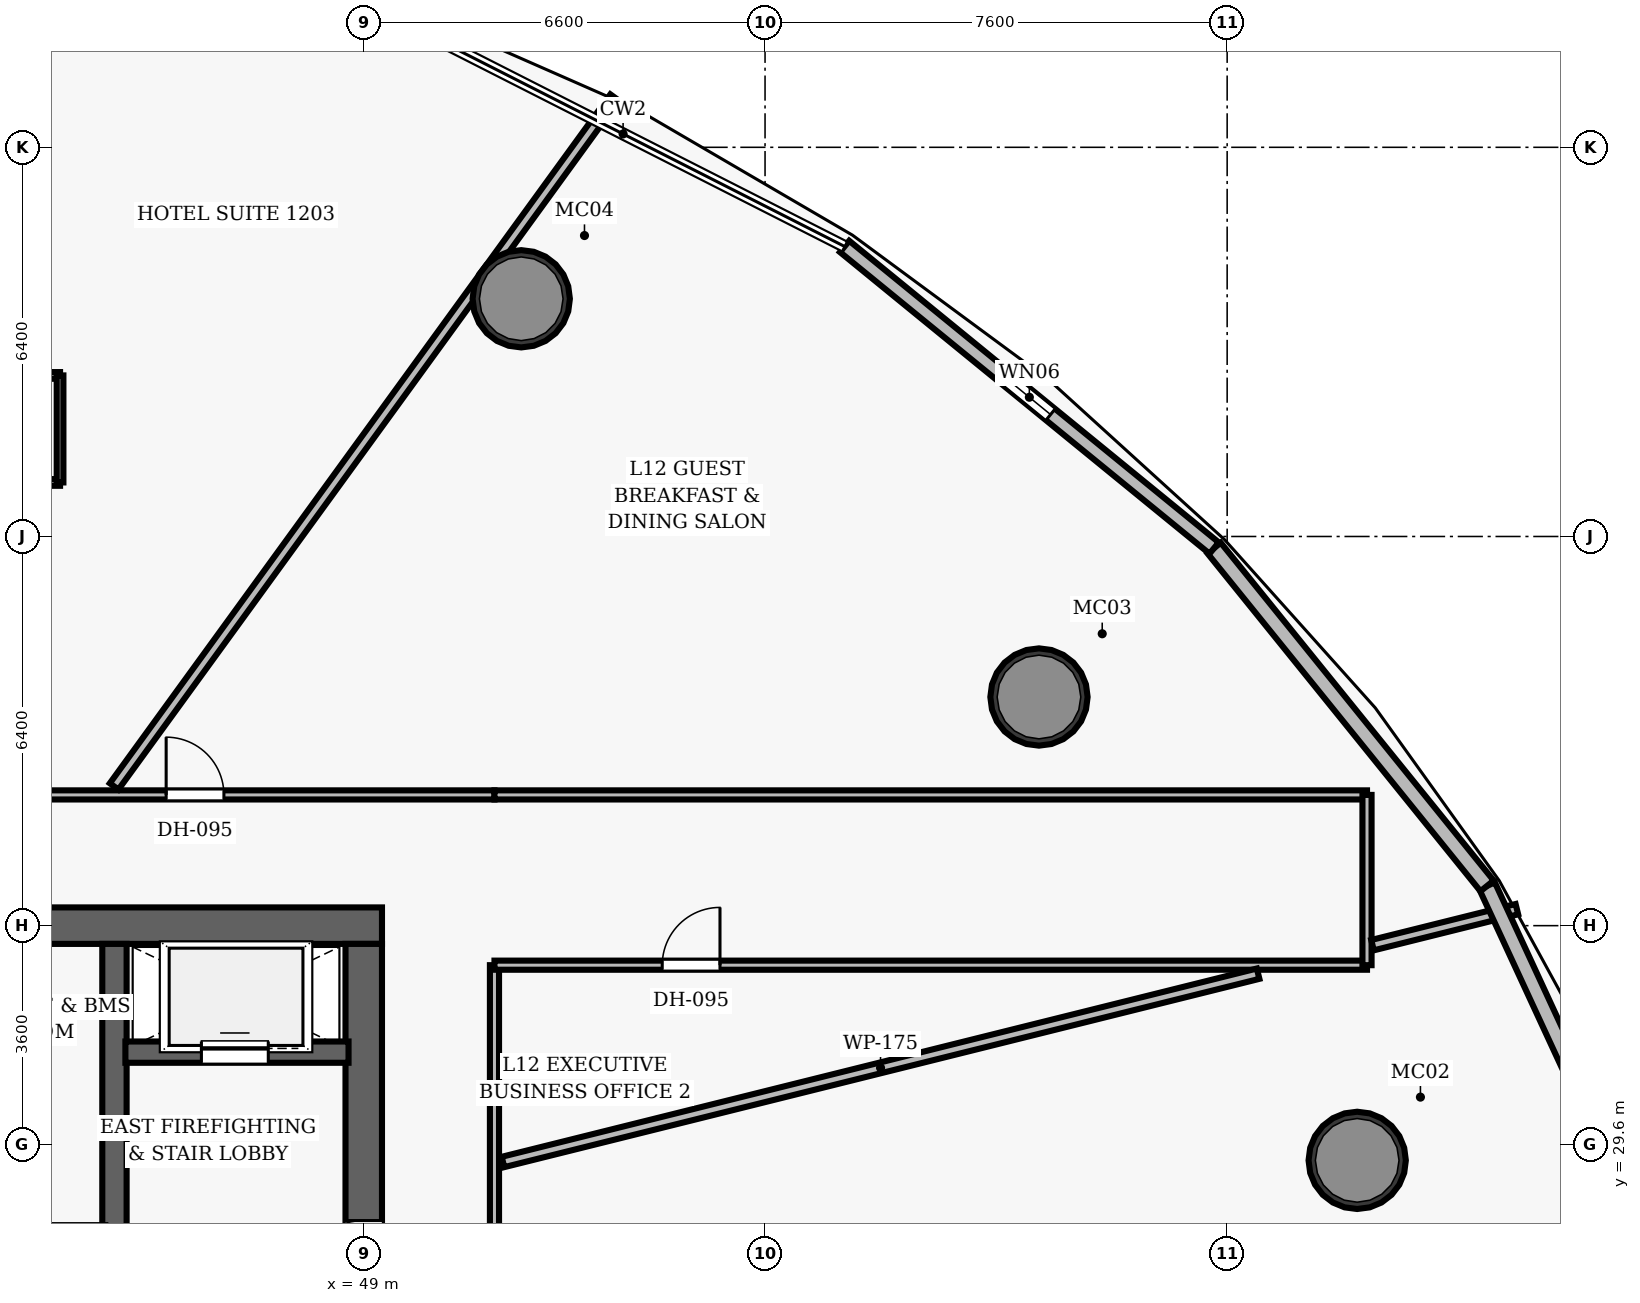
"""IFC4 building model, lengths in metres.
Left out: names, types, materials, properties, quantities, classifications, styles, units other than length and angle.
Written with IfcOpenShell. Run it as: python <this file> out.ifc"""

import sys

from ifc_helpers import new_model, si_unit, direction, frame, frame_2d, origin, origin_2d, place, context, subcontext, project, spatial, rectangle, hollow_circle, extrude, element, fill, save


model = new_model("IFC4")
c1 = context("Model", 3, precision=1e-05, world=origin(), true_north=direction((0.0, 1.0)))
c2 = subcontext(c1, "Body", "Model", "MODEL_VIEW")
j1 = project(units=[si_unit("LENGTHUNIT", "METRE"), si_unit("PLANEANGLEUNIT", "RADIAN")], contexts=[c1])
p1 = place(None, origin())
s1 = spatial("IfcSite", under=j1, at=p1, CompositionType="ELEMENT")
p2 = place(p1, origin())
s2 = spatial("IfcBuilding", under=s1, at=p2, CompositionType="ELEMENT")
p3 = place(p2, frame((0.0, 0.0, 58.9)))
s3 = spatial("IfcBuildingStorey", under=s2, at=p3, CompositionType="ELEMENT", Elevation=58.9)
p4 = place(p3, frame((26.7, 33.2, 0.0), z_axis=(0.0, 0.0, 1.0), x_axis=(1.0, 0.0, 0.0)))
e1 = element("IfcWall", 1, at=p4, inside=s3, PredefinedType="SHEAR", context=c2, shape_type="SweptSolid", body=[
    extrude(rectangle(XDim=22.6, YDim=0.6, at=frame_2d((11.3, 0.0))), origin(), (0.0, 0.0, 1.0), 3.5),
])
p5 = place(p4, frame((4.62, 0.0, 0.0)))
e2 = element("IfcOpeningElement", 2, at=p5, cuts=e1, PredefinedType="OPENING", context=c2, shape_type="SweptSolid", body=[
    extrude(rectangle(XDim=1.05, YDim=2.15, at=frame_2d((0.525, 1.075))), frame((0.0, 0.31, 0.0), z_axis=(0.0, -1.0, 0.0), x_axis=(1.0, 0.0, 0.0)), (0.0, 0.0, 1.0), 0.62),
])
p6 = place(p4, frame((14.52, 0.0, 0.0)))
e3 = element("IfcOpeningElement", 3, at=p6, cuts=e1, PredefinedType="OPENING", context=c2, shape_type="SweptSolid", body=[
    extrude(rectangle(XDim=1.05, YDim=2.15, at=frame_2d((0.525, 1.075))), frame((0.0, 0.31, 0.0), z_axis=(0.0, -1.0, 0.0), x_axis=(1.0, 0.0, 0.0)), (0.0, 0.0, 1.0), 0.62),
])
p7 = place(p3, frame((49.0, 19.1, 0.0), z_axis=(0.0, 0.0, 1.0), x_axis=(0.0, 1.0, 0.0)))
e4 = element("IfcWall", 4, at=p7, inside=s3, PredefinedType="SHEAR", context=c2, shape_type="SweptSolid", body=[
    extrude(rectangle(XDim=13.8, YDim=0.6, at=frame_2d((6.9, 0.0))), origin(), (0.0, 0.0, 1.0), 3.5),
])
p8 = place(p7, frame((8.2, 0.0, 0.0)))
e5 = element("IfcOpeningElement", 5, at=p8, cuts=e4, PredefinedType="OPENING", context=c2, shape_type="SweptSolid", body=[
    extrude(rectangle(XDim=1.05, YDim=2.15, at=frame_2d((0.525, 1.075))), frame((0.0, 0.31, 0.0), z_axis=(0.0, -1.0, 0.0), x_axis=(1.0, 0.0, 0.0)), (0.0, 0.0, 1.0), 0.62),
])
p9 = place(p3, frame((44.9, 19.1, 0.0), z_axis=(0.0, 0.0, 1.0), x_axis=(0.0, 1.0, 0.0)))
e6 = element("IfcWall", 6, at=p9, inside=s3, PredefinedType="SHEAR", context=c2, shape_type="SweptSolid", body=[
    extrude(rectangle(XDim=13.8, YDim=0.4, at=frame_2d((6.9, 0.0))), origin(), (0.0, 0.0, 1.0), 3.5),
])
for number, where, z_axis, x_axis in (
    (7, (65.339, 29.34, 0.0), (0.0, 0.0, 1.0), (1.0, 0.0, 0.0)),
    (8, (60.105, 36.96, 0.0), (0.0, 0.0, 1.0), (1.0, 0.0, 0.0)),
    (9, (51.59, 43.509, 0.0), (0.0, 0.0, 1.0), (1.0, 0.0, 0.0)),
):
    element("IfcColumn", number, at=place(p3, frame(where, z_axis=z_axis, x_axis=x_axis)), inside=s3, PredefinedType="COLUMN", context=c2, shape_type="SweptSolid", body=[
        extrude(hollow_circle(Radius=0.8, WallThickness=0.06, at=origin_2d()), origin(), (0.0, 0.0, 1.0), 3.5),
    ])
p10 = place(p3, frame((45.08, 31.12, 0.0), z_axis=(0.0, 0.0, 1.0), x_axis=(1.0, 0.0, 0.0)))
e10 = element("IfcWall", 10, at=p10, inside=s3, PredefinedType="SHEAR", context=c2, shape_type="SweptSolid", body=[
    extrude(rectangle(XDim=3.67, YDim=0.35, at=frame_2d((1.835, 0.0))), origin(), (0.0, 0.0, 1.0), 2.6),
])
p11 = place(p10, frame((1.25, 0.0, 0.0)))
e11 = element("IfcOpeningElement", 11, at=p11, cuts=e10, PredefinedType="OPENING", context=c2, shape_type="SweptSolid", body=[
    extrude(rectangle(XDim=1.1, YDim=2.15, at=frame_2d((0.55, 1.075))), frame((0.0, 0.185, 0.0), z_axis=(0.0, -1.0, 0.0), x_axis=(1.0, 0.0, 0.0)), (0.0, 0.0, 1.0), 0.37),
])
p12 = place(p3, frame((27.65, 35.35, 0.0), z_axis=(0.0, 0.0, 1.0), x_axis=(1.0, 0.0, 0.0)))
e12 = element("IfcWall", 12, at=p12, inside=s3, PredefinedType="PARTITIONING", context=c2, shape_type="SweptSolid", body=[
    extrude(rectangle(XDim=23.5, YDim=0.15, at=frame_2d((11.75, 0.0))), origin(), (0.0, 0.0, 1.0), 2.6),
])
p13 = place(p12, frame((18.1, 0.0, 0.0)))
e13 = element("IfcOpeningElement", 13, at=p13, cuts=e12, PredefinedType="OPENING", context=c2, shape_type="SweptSolid", body=[
    extrude(rectangle(XDim=0.95, YDim=2.15, at=frame_2d((0.475, 1.075))), frame((0.0, 0.085, 0.0), z_axis=(0.0, -1.0, 0.0), x_axis=(1.0, 0.0, 0.0)), (0.0, 0.0, 1.0), 0.17),
])
p14 = place(p12, frame((14.212, 0.0, 0.0)))
e14 = element("IfcOpeningElement", 14, at=p14, cuts=e12, PredefinedType="OPENING", context=c2, shape_type="SweptSolid", body=[
    extrude(rectangle(XDim=0.95, YDim=2.15, at=frame_2d((0.475, 1.075))), frame((0.0, 0.085, 0.0), z_axis=(0.0, -1.0, 0.0), x_axis=(1.0, 0.0, 0.0)), (0.0, 0.0, 1.0), 0.17),
])
p15 = place(p12, frame((7.232, 0.0, 0.0)))
e15 = element("IfcOpeningElement", 15, at=p15, cuts=e12, PredefinedType="OPENING", context=c2, shape_type="SweptSolid", body=[
    extrude(rectangle(XDim=0.95, YDim=2.15, at=frame_2d((0.475, 1.075))), frame((0.0, 0.085, 0.0), z_axis=(0.0, -1.0, 0.0), x_axis=(1.0, 0.0, 0.0)), (0.0, 0.0, 1.0), 0.17),
])
p16 = place(p3, frame((51.15, 16.65, 0.0), z_axis=(0.0, 0.0, 1.0), x_axis=(0.0, 1.0, 0.0)))
e16 = element("IfcWall", 16, at=p16, inside=s3, PredefinedType="PARTITIONING", context=c2, shape_type="SweptSolid", body=[
    extrude(rectangle(XDim=15.9, YDim=0.15, at=frame_2d((7.95, 0.0))), origin(), (0.0, 0.0, 1.0), 2.6),
])
p17 = place(p16, frame((7.292, 0.0, 0.0)))
e17 = element("IfcOpeningElement", 17, at=p17, cuts=e16, PredefinedType="OPENING", context=c2, shape_type="SweptSolid", body=[
    extrude(rectangle(XDim=0.95, YDim=2.15, at=frame_2d((0.475, 1.075))), frame((0.0, 0.085, 0.0), z_axis=(0.0, -1.0, 0.0), x_axis=(1.0, 0.0, 0.0)), (0.0, 0.0, 1.0), 0.17),
])
p18 = place(p3, frame((51.15, 35.35, 0.0), z_axis=(0.0, 0.0, 1.0), x_axis=(1.0, 0.0, 0.0)))
e18 = element("IfcWall", 18, at=p18, inside=s3, PredefinedType="PARTITIONING", context=c2, shape_type="SweptSolid", body=[
    extrude(rectangle(XDim=14.35, YDim=0.15, at=frame_2d((7.175, 0.0))), origin(), (0.0, 0.0, 1.0), 2.6),
])
p19 = place(p3, frame((51.15, 32.55, 0.0), z_axis=(0.0, 0.0, 1.0), x_axis=(1.0, 0.0, 0.0)))
e19 = element("IfcWall", 19, at=p19, inside=s3, PredefinedType="PARTITIONING", context=c2, shape_type="SweptSolid", body=[
    extrude(rectangle(XDim=14.35, YDim=0.15, at=frame_2d((7.175, 0.0))), origin(), (0.0, 0.0, 1.0), 2.6),
])
p20 = place(p19, frame((2.759, 0.0, 0.0)))
e20 = element("IfcOpeningElement", 20, at=p20, cuts=e19, PredefinedType="OPENING", context=c2, shape_type="SweptSolid", body=[
    extrude(rectangle(XDim=0.95, YDim=2.15, at=frame_2d((0.475, 1.075))), frame((0.0, 0.085, 0.0), z_axis=(0.0, -1.0, 0.0), x_axis=(1.0, 0.0, 0.0)), (0.0, 0.0, 1.0), 0.17),
])
p21 = place(p3, frame((65.5, 32.55, 0.0), z_axis=(0.0, 0.0, 1.0), x_axis=(0.0, 1.0, 0.0)))
e21 = element("IfcWall", 21, at=p21, inside=s3, PredefinedType="PARTITIONING", context=c2, shape_type="SweptSolid", body=[
    extrude(rectangle(XDim=2.8, YDim=0.15, at=frame_2d((1.4, 0.0))), origin(), (0.0, 0.0, 1.0), 2.6),
])
p22 = place(p3, frame((51.29, 29.314, 0.0), z_axis=(0.0, 0.0, 1.0), x_axis=(0.970299383645, 0.241907226221, 0.0)))
e22 = element("IfcWall", 22, at=p22, inside=s3, PredefinedType="PARTITIONING", context=c2, shape_type="SweptSolid", body=[
    extrude(rectangle(XDim=12.799, YDim=0.175, at=frame_2d((6.399, 0.0))), origin(), (0.0, 0.0, 1.0), 2.6),
])
p23 = place(p3, frame((65.591, 32.879, 0.0), z_axis=(0.0, 0.0, 1.0), x_axis=(0.970294886869, 0.241925262251, 0.0)))
e23 = element("IfcWall", 23, at=p23, inside=s3, PredefinedType="PARTITIONING", context=c2, shape_type="SweptSolid", body=[
    extrude(rectangle(XDim=2.447, YDim=0.175, at=frame_2d((1.224, 0.0))), origin(), (0.0, 0.0, 1.0), 2.6),
])
p24 = place(p3, frame((44.895, 35.49, 0.0), z_axis=(0.0, 0.0, 1.0), x_axis=(0.587777731852, 0.809022458241, 0.0)))
e24 = element("IfcWall", 24, at=p24, inside=s3, PredefinedType="PARTITIONING", context=c2, shape_type="SweptSolid", body=[
    extrude(rectangle(XDim=14.004, YDim=0.175, at=frame_2d((7.002, 0.0))), origin(), (0.0, 0.0, 1.0), 2.6),
])
p25 = place(p3, frame((41.805, 40.489, 0.0), z_axis=(0.0, 0.0, 1.0), x_axis=(1.0, 0.0, 0.0)))
e25 = element("IfcWall", 25, at=p25, inside=s3, PredefinedType="PARTITIONING", context=c2, shape_type="SweptSolid", body=[
    extrude(rectangle(XDim=2.2, YDim=0.11, at=frame_2d((1.1, 0.0))), origin(), (0.0, 0.0, 1.0), 2.6),
])
p26 = place(p3, frame((41.805, 42.249, 0.0), z_axis=(0.0, 0.0, 1.0), x_axis=(1.0, 0.0, 0.0)))
e26 = element("IfcWall", 26, at=p26, inside=s3, PredefinedType="PARTITIONING", context=c2, shape_type="SweptSolid", body=[
    extrude(rectangle(XDim=2.2, YDim=0.11, at=frame_2d((1.1, 0.0))), origin(), (0.0, 0.0, 1.0), 2.6),
])
p27 = place(p26, frame((0.68, 0.0, 0.0)))
e27 = element("IfcOpeningElement", 27, at=p27, cuts=e26, PredefinedType="OPENING", context=c2, shape_type="SweptSolid", body=[
    extrude(rectangle(XDim=0.85, YDim=2.1, at=frame_2d((0.425, 1.05))), frame((0.0, 0.065, 0.0), z_axis=(0.0, -1.0, 0.0), x_axis=(1.0, 0.0, 0.0)), (0.0, 0.0, 1.0), 0.13),
])
p28 = place(p3, frame((44.006, 40.489, 0.0), z_axis=(0.0, 0.0, 1.0), x_axis=(0.0, 1.0, 0.0)))
e28 = element("IfcWall", 28, at=p28, inside=s3, PredefinedType="PARTITIONING", context=c2, shape_type="SweptSolid", body=[
    extrude(rectangle(XDim=1.76, YDim=0.11, at=frame_2d((0.88, 0.0))), origin(), (0.0, 0.0, 1.0), 2.6),
])
p29 = place(p3, frame((67.475, 33.854, 0.0), z_axis=(0.0, 0.0, 1.0), x_axis=(0.41977831576, -0.907626666432, 0.0)))
e29 = element("IfcWall", 29, at=p29, inside=s3, PredefinedType="SOLIDWALL", context=c2, shape_type="SweptSolid", body=[
    extrude(rectangle(XDim=6.212, YDim=0.28, at=frame_2d((3.106, 0.0))), origin(), (0.0, 0.0, 1.0), 3.25),
])
p30 = place(p3, frame((62.986, 39.41, 0.0), z_axis=(0.0, 0.0, 1.0), x_axis=(0.628451663088, -0.777848640265, 0.0)))
e30 = element("IfcWall", 30, at=p30, inside=s3, PredefinedType="SOLIDWALL", context=c2, shape_type="SweptSolid", body=[
    extrude(rectangle(XDim=7.143, YDim=0.28, at=frame_2d((3.572, 0.0))), origin(), (0.0, 0.0, 1.0), 3.25),
])
p31 = place(p3, frame((56.908, 44.37, 0.0), z_axis=(0.0, 0.0, 1.0), x_axis=(0.774759508841, -0.632256042644, 0.0)))
e31 = element("IfcWall", 31, at=p31, inside=s3, PredefinedType="SOLIDWALL", context=c2, shape_type="SweptSolid", body=[
    extrude(rectangle(XDim=7.845, YDim=0.24, at=frame_2d((3.922, 0.0))), origin(), (0.0, 0.0, 1.0), 3.25),
])
p32 = place(p31, frame((3.472, 0.0, 0.85)))
e32 = element("IfcOpeningElement", 32, at=p32, cuts=e31, PredefinedType="OPENING", context=c2, shape_type="SweptSolid", body=[
    extrude(rectangle(XDim=0.9, YDim=1.5, at=frame_2d((0.45, 0.75))), frame((0.0, 0.13, 0.0), z_axis=(0.0, -1.0, 0.0), x_axis=(1.0, 0.0, 0.0)), (0.0, 0.0, 1.0), 0.26),
])
p33 = place(p8, origin())
e33 = element("IfcDoor", 33, at=p33, inside=s3, OperationType="SINGLE_SWING_LEFT", PredefinedType="DOOR", context=c2, shape_type="SweptSolid", body=[
    extrude(rectangle(XDim=1.05, YDim=2.15, at=frame_2d((0.525, 1.075))), frame((0.0, 0.025, 0.0), z_axis=(0.0, -1.0, 0.0), x_axis=(1.0, 0.0, 0.0)), (0.0, 0.0, 1.0), 0.05),
])
fill(e5, e33)
p34 = place(p13, origin())
e34 = element("IfcDoor", 34, at=p34, inside=s3, OperationType="SINGLE_SWING_LEFT", PredefinedType="DOOR", context=c2, shape_type="SweptSolid", body=[
    extrude(rectangle(XDim=0.95, YDim=2.15, at=frame_2d((0.475, 1.075))), frame((0.0, 0.025, 0.0), z_axis=(0.0, -1.0, 0.0), x_axis=(1.0, 0.0, 0.0)), (0.0, 0.0, 1.0), 0.05),
])
fill(e13, e34)
p35 = place(p20, origin())
e35 = element("IfcDoor", 35, at=p35, inside=s3, OperationType="SINGLE_SWING_RIGHT", PredefinedType="DOOR", context=c2, shape_type="SweptSolid", body=[
    extrude(rectangle(XDim=0.95, YDim=2.15, at=frame_2d((0.475, 1.075))), frame((0.0, 0.025, 0.0), z_axis=(0.0, -1.0, 0.0), x_axis=(1.0, 0.0, 0.0)), (0.0, 0.0, 1.0), 0.05),
])
fill(e20, e35)
p36 = place(p11, origin())
e36 = element("IfcDoor", 36, at=p36, inside=s3, OperationType="SLIDING_TO_LEFT", PredefinedType="DOOR", context=c2, shape_type="SweptSolid", body=[
    extrude(rectangle(XDim=1.1, YDim=2.15, at=frame_2d((0.55, 1.075))), frame((0.0, 0.025, 0.0), z_axis=(0.0, -1.0, 0.0), x_axis=(1.0, 0.0, 0.0)), (0.0, 0.0, 1.0), 0.05),
])
fill(e11, e36)
p37 = place(p32, origin())
e37 = element("IfcWindow", 37, at=p37, inside=s3, PartitioningType="SINGLE_PANEL", PredefinedType="WINDOW", context=c2, shape_type="SweptSolid", body=[
    extrude(rectangle(XDim=0.9, YDim=1.5, at=frame_2d((0.45, 0.75))), frame((0.0, 0.03, 0.0), z_axis=(0.0, -1.0, 0.0), x_axis=(1.0, 0.0, 0.0)), (0.0, 0.0, 1.0), 0.06),
])
fill(e32, e37)
save(model, sys.argv[1])
